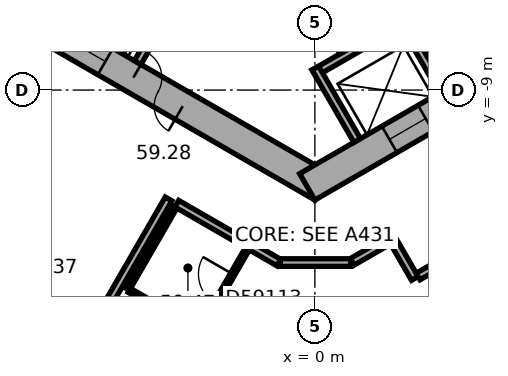
"""IFC4 building model, lengths in metres.
Left out: names, types, materials, properties, quantities, classifications, styles, units other than length and angle.
Written with IfcOpenShell. Run it as: python <this file> out.ifc"""

import sys

from ifc_helpers import new_model, si_unit, direction, frame, frame_2d, origin, place, context, subcontext, project, spatial, rectangle, extrude, element, fill, save


model = new_model("IFC4")
c1 = context("Model", 3, precision=1e-05, world=origin(), true_north=direction((0.0, 1.0)))
c2 = subcontext(c1, "Body", "Model", "MODEL_VIEW")
j1 = project(units=[si_unit("LENGTHUNIT", "METRE"), si_unit("PLANEANGLEUNIT", "RADIAN")], contexts=[c1])
p1 = place(None, origin())
s1 = spatial("IfcSite", under=j1, at=p1, CompositionType="ELEMENT")
p2 = place(p1, origin())
s2 = spatial("IfcBuilding", under=s1, at=p2, CompositionType="ELEMENT")
p3 = place(p2, frame((0.0, 0.0, 240.2)))
s3 = spatial("IfcBuildingStorey", under=s2, at=p3, CompositionType="ELEMENT", Elevation=240.2)
p4 = place(p3, frame((-10.1, -5.6, 0.0), z_axis=(0.0, 0.0, 1.0), x_axis=(0.866023897231, -0.500002609418, 0.0)))
e1 = element("IfcWall", 1, at=p4, inside=s3, PredefinedType="SHEAR", context=c2, shape_type="SweptSolid", body=[
    extrude(rectangle(XDim=11.894, YDim=0.8, at=frame_2d((5.947, 0.0))), origin(), (0.0, 0.0, 1.0), 3.7),
])
p5 = place(p4, frame((6.147, 0.0, 0.0)))
e2 = element("IfcOpeningElement", 2, at=p5, cuts=e1, PredefinedType="OPENING", context=c2, shape_type="SweptSolid", body=[
    extrude(rectangle(XDim=1.5, YDim=2.1, at=frame_2d((0.75, 1.05))), frame((0.0, 0.41, 0.0), z_axis=(0.0, -1.0, 0.0), x_axis=(1.0, 0.0, 0.0)), (0.0, 0.0, 1.0), 0.82),
])
p6 = place(p4, frame((1.597, 0.0, 0.0)))
e3 = element("IfcOpeningElement", 3, at=p6, cuts=e1, PredefinedType="OPENING", context=c2, shape_type="SweptSolid", body=[
    extrude(rectangle(XDim=1.1, YDim=2.1, at=frame_2d((0.55, 1.05))), frame((0.0, 0.41, 0.0), z_axis=(0.0, -1.0, 0.0), x_axis=(1.0, 0.0, 0.0)), (0.0, 0.0, 1.0), 0.82),
])
p7 = place(p4, frame((4.197, 0.0, 0.0)))
e4 = element("IfcOpeningElement", 4, at=p7, cuts=e1, PredefinedType="OPENING", context=c2, shape_type="SweptSolid", body=[
    extrude(rectangle(XDim=1.1, YDim=2.1, at=frame_2d((0.55, 1.05))), frame((0.0, 0.41, 0.0), z_axis=(0.0, -1.0, 0.0), x_axis=(1.0, 0.0, 0.0)), (0.0, 0.0, 1.0), 0.82),
])
p8 = place(p3, frame((-0.2, -11.547, 0.0), z_axis=(0.0, 0.0, 1.0), x_axis=(0.866023897231, 0.500002609418, 0.0)))
e5 = element("IfcWall", 5, at=p8, inside=s3, PredefinedType="SHEAR", context=c2, shape_type="SweptSolid", body=[
    extrude(rectangle(XDim=11.894, YDim=0.8, at=frame_2d((5.947, 0.0))), origin(), (0.0, 0.0, 1.0), 3.7),
])
p9 = place(p8, frame((2.497, 0.0, 0.0)))
e6 = element("IfcOpeningElement", 6, at=p9, cuts=e5, PredefinedType="OPENING", context=c2, shape_type="SweptSolid", body=[
    extrude(rectangle(XDim=1.1, YDim=2.1, at=frame_2d((0.55, 1.05))), frame((0.0, 0.41, 0.0), z_axis=(0.0, -1.0, 0.0), x_axis=(1.0, 0.0, 0.0)), (0.0, 0.0, 1.0), 0.82),
])
p10 = place(p8, frame((5.097, 0.0, 0.0)))
e7 = element("IfcOpeningElement", 7, at=p10, cuts=e5, PredefinedType="OPENING", context=c2, shape_type="SweptSolid", body=[
    extrude(rectangle(XDim=1.1, YDim=2.1, at=frame_2d((0.55, 1.05))), frame((0.0, 0.41, 0.0), z_axis=(0.0, -1.0, 0.0), x_axis=(1.0, 0.0, 0.0)), (0.0, 0.0, 1.0), 0.82),
])
p11 = place(p8, frame((7.697, 0.0, 0.0)))
e8 = element("IfcOpeningElement", 8, at=p11, cuts=e5, PredefinedType="OPENING", context=c2, shape_type="SweptSolid", body=[
    extrude(rectangle(XDim=1.1, YDim=2.1, at=frame_2d((0.55, 1.05))), frame((0.0, 0.41, 0.0), z_axis=(0.0, -1.0, 0.0), x_axis=(1.0, 0.0, 0.0)), (0.0, 0.0, 1.0), 0.82),
])
p12 = place(p3, frame((-17.664, -13.415, 0.0), z_axis=(0.0, 0.0, 1.0), x_axis=(0.866026555358, -0.49999800541, 0.0)))
e9 = element("IfcWall", 9, at=p12, inside=s3, PredefinedType="STANDARD", context=c2, shape_type="SweptSolid", body=[
    extrude(rectangle(XDim=18.841, YDim=0.2, at=frame_2d((9.421, 0.0))), origin(), (0.0, 0.0, 1.0), 3.7),
])
p13 = place(p12, frame((1.254, 0.0, 0.9)))
e10 = element("IfcOpeningElement", 10, at=p13, cuts=e9, PredefinedType="OPENING", context=c2, shape_type="SweptSolid", body=[
    extrude(rectangle(XDim=2.2, YDim=2.0, at=frame_2d((1.1, 1.0))), frame((0.0, 0.11, 0.0), z_axis=(0.0, -1.0, 0.0), x_axis=(1.0, 0.0, 0.0)), (0.0, 0.0, 1.0), 0.22),
])
p14 = place(p12, frame((4.788, 0.0, 0.9)))
e11 = element("IfcOpeningElement", 11, at=p14, cuts=e9, PredefinedType="OPENING", context=c2, shape_type="SweptSolid", body=[
    extrude(rectangle(XDim=2.2, YDim=2.0, at=frame_2d((1.1, 1.0))), frame((0.0, 0.11, 0.0), z_axis=(0.0, -1.0, 0.0), x_axis=(1.0, 0.0, 0.0)), (0.0, 0.0, 1.0), 0.22),
])
p15 = place(p12, frame((8.322, 0.0, 0.9)))
e12 = element("IfcOpeningElement", 12, at=p15, cuts=e9, PredefinedType="OPENING", context=c2, shape_type="SweptSolid", body=[
    extrude(rectangle(XDim=2.2, YDim=2.0, at=frame_2d((1.1, 1.0))), frame((0.0, 0.11, 0.0), z_axis=(0.0, -1.0, 0.0), x_axis=(1.0, 0.0, 0.0)), (0.0, 0.0, 1.0), 0.22),
])
p16 = place(p12, frame((11.855, 0.0, 0.9)))
e13 = element("IfcOpeningElement", 13, at=p16, cuts=e9, PredefinedType="OPENING", context=c2, shape_type="SweptSolid", body=[
    extrude(rectangle(XDim=2.2, YDim=2.0, at=frame_2d((1.1, 1.0))), frame((0.0, 0.11, 0.0), z_axis=(0.0, -1.0, 0.0), x_axis=(1.0, 0.0, 0.0)), (0.0, 0.0, 1.0), 0.22),
])
p17 = place(p12, frame((15.389, 0.0, 0.9)))
e14 = element("IfcOpeningElement", 14, at=p17, cuts=e9, PredefinedType="OPENING", context=c2, shape_type="SweptSolid", body=[
    extrude(rectangle(XDim=2.2, YDim=2.0, at=frame_2d((1.1, 1.0))), frame((0.0, 0.11, 0.0), z_axis=(0.0, -1.0, 0.0), x_axis=(1.0, 0.0, 0.0)), (0.0, 0.0, 1.0), 0.22),
])
p18 = place(p3, frame((2.739, -22.711, 0.0), z_axis=(0.0, 0.0, 1.0), x_axis=(0.833885723098, 0.551937134838, 0.0)))
e15 = element("IfcWall", 15, at=p18, inside=s3, PredefinedType="STANDARD", context=c2, shape_type="SweptSolid", body=[
    extrude(rectangle(XDim=18.841, YDim=0.2, at=frame_2d((9.421, 0.0))), origin(), (0.0, 0.0, 1.0), 3.7),
])
p19 = place(p18, frame((1.252, 0.0, 0.9)))
e16 = element("IfcOpeningElement", 16, at=p19, cuts=e15, PredefinedType="OPENING", context=c2, shape_type="SweptSolid", body=[
    extrude(rectangle(XDim=2.2, YDim=2.0, at=frame_2d((1.1, 1.0))), frame((0.0, 0.11, 0.0), z_axis=(0.0, -1.0, 0.0), x_axis=(1.0, 0.0, 0.0)), (0.0, 0.0, 1.0), 0.22),
])
p20 = place(p18, frame((4.786, 0.0, 0.9)))
e17 = element("IfcOpeningElement", 17, at=p20, cuts=e15, PredefinedType="OPENING", context=c2, shape_type="SweptSolid", body=[
    extrude(rectangle(XDim=2.2, YDim=2.0, at=frame_2d((1.1, 1.0))), frame((0.0, 0.11, 0.0), z_axis=(0.0, -1.0, 0.0), x_axis=(1.0, 0.0, 0.0)), (0.0, 0.0, 1.0), 0.22),
])
p21 = place(p18, frame((8.32, 0.0, 0.9)))
e18 = element("IfcOpeningElement", 18, at=p21, cuts=e15, PredefinedType="OPENING", context=c2, shape_type="SweptSolid", body=[
    extrude(rectangle(XDim=2.2, YDim=2.0, at=frame_2d((1.1, 1.0))), frame((0.0, 0.11, 0.0), z_axis=(0.0, -1.0, 0.0), x_axis=(1.0, 0.0, 0.0)), (0.0, 0.0, 1.0), 0.22),
])
p22 = place(p18, frame((11.854, 0.0, 0.9)))
e19 = element("IfcOpeningElement", 19, at=p22, cuts=e15, PredefinedType="OPENING", context=c2, shape_type="SweptSolid", body=[
    extrude(rectangle(XDim=2.2, YDim=2.0, at=frame_2d((1.1, 1.0))), frame((0.0, 0.11, 0.0), z_axis=(0.0, -1.0, 0.0), x_axis=(1.0, 0.0, 0.0)), (0.0, 0.0, 1.0), 0.22),
])
p23 = place(p18, frame((15.387, 0.0, 0.9)))
e20 = element("IfcOpeningElement", 20, at=p23, cuts=e15, PredefinedType="OPENING", context=c2, shape_type="SweptSolid", body=[
    extrude(rectangle(XDim=2.2, YDim=2.0, at=frame_2d((1.1, 1.0))), frame((0.0, 0.11, 0.0), z_axis=(0.0, -1.0, 0.0), x_axis=(1.0, 0.0, 0.0)), (0.0, 0.0, 1.0), 0.22),
])
p24 = place(p3, frame((-3.563, -6.372, 0.0), z_axis=(0.0, 0.0, 1.0), x_axis=(-0.499994660107, -0.866028486751, 0.0)))
e21 = element("IfcWall", 21, at=p24, inside=s3, PredefinedType="PARTITIONING", context=c2, shape_type="SweptSolid", body=[
    extrude(rectangle(XDim=2.2, YDim=0.2, at=frame_2d((1.1, 0.0))), origin(), (0.0, 0.0, 1.0), 3.42),
])
p25 = place(p3, frame((-0.024, -8.559, 0.0), z_axis=(0.0, 0.0, 1.0), x_axis=(0.866026010844, 0.49999894854, 0.0)))
e22 = element("IfcWall", 22, at=p25, inside=s3, PredefinedType="PARTITIONING", context=c2, shape_type="SweptSolid", body=[
    extrude(rectangle(XDim=8.0, YDim=0.2, at=frame_2d((4.0, 0.0))), origin(), (0.0, 0.0, 1.0), 3.42),
])
for number, where, z_axis, x_axis in (
    (23, (0.013, -8.422, 0.0), (0.0, 0.0, 1.0), (0.5, -0.866, 0.0)),
    (24, (2.264, -7.122, 0.0), (0.0, 0.0, 1.0), (0.5, -0.866, 0.0)),
):
    element("IfcWall", number, at=place(p3, frame(where, z_axis=z_axis, x_axis=x_axis)), inside=s3, PredefinedType="PARTITIONING", context=c2, shape_type="SweptSolid", body=[
        extrude(rectangle(XDim=2.2, YDim=0.2, at=frame_2d((1.1, 0.0))), origin(), (0.0, 0.0, 1.0), 3.42),
    ])
p26 = place(p3, frame((-1.558, -3.902, 0.0), z_axis=(0.0, 0.0, 1.0), x_axis=(0.499977259774, -0.866038532462, 0.0)))
e25 = element("IfcWall", 25, at=p26, inside=s3, PredefinedType="SHEAR", context=c2, shape_type="SweptSolid", body=[
    extrude(rectangle(XDim=4.7, YDim=0.3, at=frame_2d((2.35, 0.0))), origin(), (0.0, 0.0, 1.0), 3.42),
])
p27 = place(p26, frame((0.8, 0.0, 0.0)))
e26 = element("IfcOpeningElement", 26, at=p27, cuts=e25, PredefinedType="OPENING", context=c2, shape_type="SweptSolid", body=[
    extrude(rectangle(XDim=1.2, YDim=2.1, at=frame_2d((0.6, 1.05))), frame((0.0, 0.16, 0.0), z_axis=(0.0, -1.0, 0.0), x_axis=(1.0, 0.0, 0.0)), (0.0, 0.0, 1.0), 0.32),
])
p28 = place(p3, frame((-7.525, -18.23, 0.0), z_axis=(0.0, 0.0, 1.0), x_axis=(0.499983153418, 0.866035129944, 0.0)))
e27 = element("IfcWall", 27, at=p28, inside=s3, PredefinedType="PARTITIONING", context=c2, shape_type="SweptSolid", body=[
    extrude(rectangle(XDim=7.35, YDim=0.2, at=frame_2d((3.675, 0.0))), origin(), (0.0, 0.0, 1.0), 3.42),
])
p29 = place(p28, frame((3.175, 0.0, 0.0)))
e28 = element("IfcOpeningElement", 28, at=p29, cuts=e27, PredefinedType="OPENING", context=c2, shape_type="SweptSolid", body=[
    extrude(rectangle(XDim=1.0, YDim=2.1, at=frame_2d((0.5, 1.05))), frame((0.0, 0.11, 0.0), z_axis=(0.0, -1.0, 0.0), x_axis=(1.0, 0.0, 0.0)), (0.0, 0.0, 1.0), 0.22),
])
p30 = place(p3, frame((-4.934, -14.241, 0.0), z_axis=(0.0, 0.0, 1.0), x_axis=(0.500004234368, 0.866022959057, 0.0)))
e29 = element("IfcWall", 29, at=p30, inside=s3, PredefinedType="PARTITIONING", context=c2, shape_type="SweptSolid", body=[
    extrude(rectangle(XDim=2.5, YDim=0.12, at=frame_2d((1.25, 0.0))), origin(), (0.0, 0.0, 1.0), 3.42),
])
p31 = place(p3, frame((-3.634, -11.99, 0.0), z_axis=(0.0, 0.0, 1.0), x_axis=(0.866033392248, -0.499986163319, 0.0)))
e30 = element("IfcWall", 30, at=p31, inside=s3, PredefinedType="PARTITIONING", context=c2, shape_type="SweptSolid", body=[
    extrude(rectangle(XDim=3.099, YDim=0.2, at=frame_2d((1.549, 0.0))), origin(), (0.0, 0.0, 1.0), 3.42),
])
p32 = place(p3, frame((-3.028, -15.341, 0.0), z_axis=(0.0, 0.0, 1.0), x_axis=(-0.86600889856, 0.500028586798, 0.0)))
e31 = element("IfcWall", 31, at=p32, inside=s3, PredefinedType="PARTITIONING", context=c2, shape_type="SweptSolid", body=[
    extrude(rectangle(XDim=2.14, YDim=0.12, at=frame_2d((1.07, 0.0))), origin(), (0.0, 0.0, 1.0), 3.42),
])
p33 = place(p3, frame((-1.778, -13.176, 0.0), z_axis=(0.0, 0.0, 1.0), x_axis=(-0.500002508028, -0.866023955769, 0.0)))
e32 = element("IfcWall", 32, at=p33, inside=s3, PredefinedType="PARTITIONING", context=c2, shape_type="SweptSolid", body=[
    extrude(rectangle(XDim=2.44, YDim=0.12, at=frame_2d((1.22, 0.0))), origin(), (0.0, 0.0, 1.0), 3.42),
])
p34 = place(p33, frame((0.77, 0.0, 0.0)))
e33 = element("IfcOpeningElement", 33, at=p34, cuts=e32, PredefinedType="OPENING", context=c2, shape_type="SweptSolid", body=[
    extrude(rectangle(XDim=0.9, YDim=2.1, at=frame_2d((0.45, 1.05))), frame((0.0, 0.07, 0.0), z_axis=(0.0, -1.0, 0.0), x_axis=(1.0, 0.0, 0.0)), (0.0, 0.0, 1.0), 0.14),
])
p35 = place(p3, frame((-0.91, -13.539, 0.0), z_axis=(0.0, 0.0, 1.0), x_axis=(1.0, 0.0, 0.0)))
e34 = element("IfcWall", 34, at=p35, inside=s3, PredefinedType="PARTITIONING", context=c2, shape_type="SweptSolid", body=[
    extrude(rectangle(XDim=1.86, YDim=0.2, at=frame_2d((0.93, 0.0))), origin(), (0.0, 0.0, 1.0), 3.42),
])
p36 = place(p3, frame((0.985, -13.519, 0.0), z_axis=(0.0, 0.0, 1.0), x_axis=(0.866054082991, 0.499950322867, 0.0)))
e35 = element("IfcWall", 35, at=p36, inside=s3, PredefinedType="PARTITIONING", context=c2, shape_type="SweptSolid", body=[
    extrude(rectangle(XDim=1.206, YDim=0.2, at=frame_2d((0.603, 0.0))), origin(), (0.0, 0.0, 1.0), 3.42),
])
p37 = place(p3, frame((2.079, -13.003, 0.0), z_axis=(0.0, 0.0, 1.0), x_axis=(0.500074377092, -0.865982457891, 0.0)))
e36 = element("IfcWall", 36, at=p37, inside=s3, PredefinedType="PARTITIONING", context=c2, shape_type="SweptSolid", body=[
    extrude(rectangle(XDim=1.101, YDim=0.2, at=frame_2d((0.55, 0.0))), origin(), (0.0, 0.0, 1.0), 3.42),
])
p38 = place(p3, frame((2.716, -13.906, 0.0), z_axis=(0.0, 0.0, 1.0), x_axis=(0.866040290674, 0.499974214264, 0.0)))
e37 = element("IfcWall", 37, at=p38, inside=s3, PredefinedType="PARTITIONING", context=c2, shape_type="SweptSolid", body=[
    extrude(rectangle(XDim=8.702, YDim=0.2, at=frame_2d((4.351, 0.0))), origin(), (0.0, 0.0, 1.0), 3.42),
])
p39 = place(p38, frame((5.26, 0.0, 0.0)))
e38 = element("IfcOpeningElement", 38, at=p39, cuts=e37, PredefinedType="OPENING", context=c2, shape_type="SweptSolid", body=[
    extrude(rectangle(XDim=1.0, YDim=2.1, at=frame_2d((0.5, 1.05))), frame((0.0, 0.11, 0.0), z_axis=(0.0, -1.0, 0.0), x_axis=(1.0, 0.0, 0.0)), (0.0, 0.0, 1.0), 0.22),
])
p40 = place(p5, origin())
e39 = element("IfcDoor", 39, at=p40, inside=s3, OperationType="DOUBLE_DOOR_SINGLE_SWING", PredefinedType="DOOR", context=c2, shape_type="SweptSolid", body=[
    extrude(rectangle(XDim=1.5, YDim=2.1, at=frame_2d((0.75, 1.05))), frame((0.0, 0.025, 0.0), z_axis=(0.0, -1.0, 0.0), x_axis=(1.0, 0.0, 0.0)), (0.0, 0.0, 1.0), 0.05),
])
fill(e2, e39)
p41 = place(p7, origin())
e40 = element("IfcDoor", 40, at=p41, inside=s3, OperationType="DOUBLE_DOOR_SLIDING", PredefinedType="DOOR", context=c2, shape_type="SweptSolid", body=[
    extrude(rectangle(XDim=1.1, YDim=2.1, at=frame_2d((0.55, 1.05))), frame((0.0, 0.025, 0.0), z_axis=(0.0, -1.0, 0.0), x_axis=(1.0, 0.0, 0.0)), (0.0, 0.0, 1.0), 0.05),
])
fill(e4, e40)
p42 = place(p9, origin())
e41 = element("IfcDoor", 41, at=p42, inside=s3, OperationType="DOUBLE_DOOR_SLIDING", PredefinedType="DOOR", context=c2, shape_type="SweptSolid", body=[
    extrude(rectangle(XDim=1.1, YDim=2.1, at=frame_2d((0.55, 1.05))), frame((0.0, 0.025, 0.0), z_axis=(0.0, -1.0, 0.0), x_axis=(1.0, 0.0, 0.0)), (0.0, 0.0, 1.0), 0.05),
])
fill(e6, e41)
p43 = place(p34, origin())
e42 = element("IfcDoor", 42, at=p43, inside=s3, OperationType="SINGLE_SWING_LEFT", PredefinedType="DOOR", context=c2, shape_type="SweptSolid", body=[
    extrude(rectangle(XDim=0.9, YDim=2.1, at=frame_2d((0.45, 1.05))), frame((0.0, 0.025, 0.0), z_axis=(0.0, -1.0, 0.0), x_axis=(1.0, 0.0, 0.0)), (0.0, 0.0, 1.0), 0.05),
])
fill(e33, e42)
save(model, sys.argv[1])
